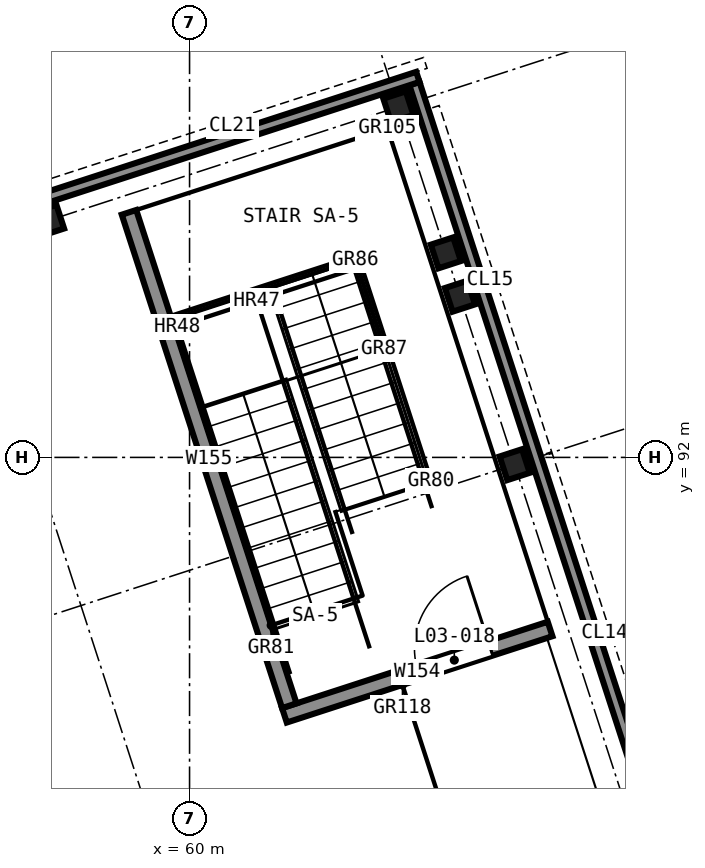
"""IFC4 building model, lengths in metres.
Left out: names, types, materials, properties, quantities, classifications, styles, units other than length and angle.
Written with IfcOpenShell. Run it as: python <this file> out.ifc"""

import sys

from ifc_helpers import new_model, si_unit, direction, frame, frame_2d, origin, origin_2d, place, context, subcontext, project, spatial, rectangle, i_section, extrude, element, fill, save


model = new_model("IFC4")
c1 = context("Model", 3, precision=1e-05, world=origin(), true_north=direction((0.0, 1.0)))
c2 = subcontext(c1, "Body", "Model", "MODEL_VIEW")
j1 = project(units=[si_unit("LENGTHUNIT", "METRE"), si_unit("PLANEANGLEUNIT", "RADIAN")], contexts=[c1])
p1 = place(None, origin())
s1 = spatial("IfcSite", under=j1, at=p1, CompositionType="ELEMENT")
p2 = place(p1, origin())
s2 = spatial("IfcBuilding", under=s1, at=p2, CompositionType="ELEMENT")
p3 = place(p2, frame((0.0, 0.0, 13.5)))
s3 = spatial("IfcBuildingStorey", under=s2, at=p3, CompositionType="ELEMENT", Elevation=13.5)
for number, where, z_axis, x_axis in (
    (1, (63.557, 94.12, 0.0), (0.0, 0.0, 1.0), (0.951, 0.309, 0.0)),
    (2, (63.372, 94.691, 0.0), (0.0, 0.0, 1.0), (0.951, 0.309, 0.0)),
):
    element("IfcColumn", number, at=place(p3, frame(where, z_axis=z_axis, x_axis=x_axis)), inside=s3, PredefinedType="COLUMN", context=c2, shape_type="SweptSolid", body=[
        extrude(i_section(OverallWidth=0.311, OverallDepth=0.327, WebThickness=0.016, FlangeThickness=0.025, FilletRadius=0.017, at=origin_2d()), origin(), (0.0, 0.0, 1.0), 4.0),
    ])
p4 = place(p3, frame((64.743, 89.743, 0.0), z_axis=(0.0, 0.0, 1.0), x_axis=(-0.95104773735, -0.309044011885, 0.0)))
e3 = element("IfcWall", 3, at=p4, inside=s3, PredefinedType="SOLIDWALL", context=c2, shape_type="SweptSolid", body=[
    extrude(rectangle(XDim=3.675, YDim=0.2, at=frame_2d((1.837, 0.0))), origin(), (0.0, 0.0, 1.0), 4.0),
])
p5 = place(p4, frame((0.825, 0.0, 0.0)))
e4 = element("IfcOpeningElement", 4, at=p5, cuts=e3, PredefinedType="OPENING", context=c2, shape_type="SweptSolid", body=[
    extrude(rectangle(XDim=1.0, YDim=2.1, at=frame_2d((0.5, 1.05))), frame((0.0, 0.11, 0.0), z_axis=(0.0, -1.0, 0.0), x_axis=(1.0, 0.0, 0.0)), (0.0, 0.0, 1.0), 0.22),
])
p6 = place(p3, frame((61.312, 88.733, 0.0), z_axis=(0.0, 0.0, 1.0), x_axis=(-0.309028643499, 0.951052731186, 0.0)))
e5 = element("IfcWall", 5, at=p6, inside=s3, PredefinedType="SOLIDWALL", context=c2, shape_type="SweptSolid", body=[
    extrude(rectangle(XDim=6.825, YDim=0.2, at=frame_2d((3.413, 0.0))), origin(), (0.0, 0.0, 1.0), 4.0),
])
for number, where, z_axis, x_axis in (
    (6, (64.277, 91.905, 0.0), (0.0, 0.0, 1.0), (0.951, 0.309, 0.0)),
    (7, (58.151, 95.119, 0.0), (0.0, 0.0, 1.0), (0.951, 0.309, 0.0)),
    (8, (62.748, 96.612, 0.0), (0.0, 0.0, 1.0), (0.951, 0.309, 0.0)),
):
    element("IfcColumn", number, at=place(p3, frame(where, z_axis=z_axis, x_axis=x_axis)), inside=s3, PredefinedType="COLUMN", context=c2, shape_type="SweptSolid", body=[
        extrude(i_section(OverallWidth=0.311, OverallDepth=0.327, WebThickness=0.016, FlangeThickness=0.025, FilletRadius=0.017, at=origin_2d()), origin(), (0.0, 0.0, 1.0), 4.0),
    ])
p7 = place(p3, frame((69.147, 77.873, 0.0), z_axis=(0.0, 0.0, 1.0), x_axis=(-0.309027903543, 0.951052971622, 0.0)))
e9 = element("IfcWall", 9, at=p7, inside=s3, PredefinedType="SOLIDWALL", context=c2, shape_type="SweptSolid", body=[
    extrude(rectangle(XDim=20.025, YDim=0.14, at=frame_2d((10.012, 0.0))), origin(), (0.0, 0.0, 1.0), 4.0),
])
p8 = place(p3, frame((35.219, 87.978, 0.0), z_axis=(0.0, 0.0, 1.0), x_axis=(0.951055192004, 0.309021070093, 0.0)))
e10 = element("IfcWall", 10, at=p8, inside=s3, PredefinedType="SOLIDWALL", context=c2, shape_type="SweptSolid", body=[
    extrude(rectangle(XDim=29.215, YDim=0.14, at=frame_2d((14.607, 0.0))), origin(), (0.0, 0.0, 1.0), 4.0),
])
p9 = place(p5, frame((1.0, 0.0, 0.0), z_axis=(0.0, 0.0, 1.0), x_axis=(-1.0, 0.0, 0.0)))
e11 = element("IfcDoor", 11, at=p9, inside=s3, OperationType="SINGLE_SWING_LEFT", PredefinedType="DOOR", context=c2, shape_type="SweptSolid", body=[
    extrude(rectangle(XDim=1.0, YDim=2.1, at=frame_2d((0.5, 1.05))), frame((0.0, 0.025, 0.0), z_axis=(0.0, -1.0, 0.0), x_axis=(1.0, 0.0, 0.0)), (0.0, 0.0, 1.0), 0.05),
])
fill(e4, e11)
save(model, sys.argv[1])
